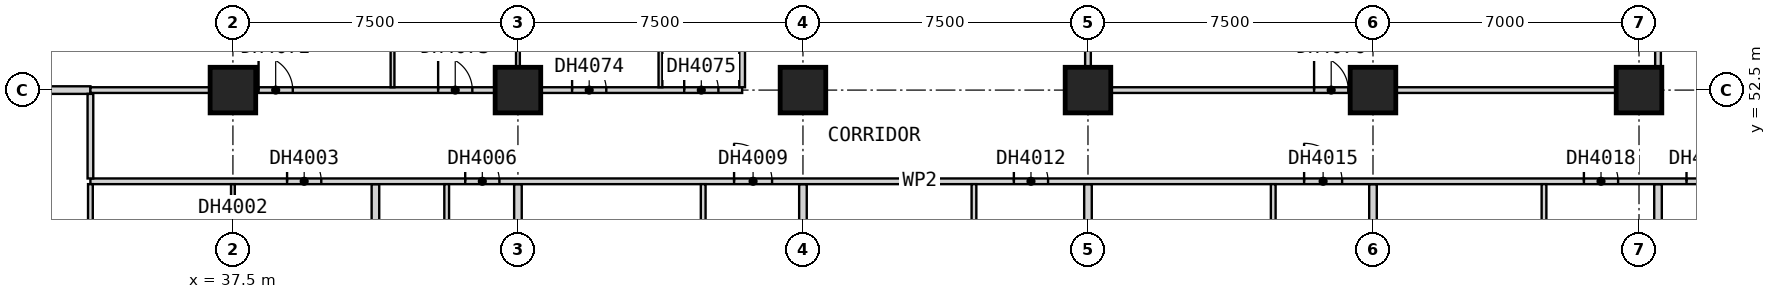
"""IFC4 building model, lengths in metres.
Left out: names, types, materials, properties, quantities, classifications, styles, units other than length and angle.
Written with IfcOpenShell. Run it as: python <this file> out.ifc"""

import sys

from ifc_helpers import new_model, si_unit, direction, frame, frame_2d, origin, origin_2d, place, context, subcontext, project, spatial, rectangle, extrude, element, fill, save


model = new_model("IFC4")
c1 = context("Model", 3, precision=1e-05, world=origin(), true_north=direction((0.0, 1.0)))
c2 = subcontext(c1, "Body", "Model", "MODEL_VIEW")
j1 = project(units=[si_unit("LENGTHUNIT", "METRE"), si_unit("PLANEANGLEUNIT", "RADIAN")], contexts=[c1])
p1 = place(None, origin())
s1 = spatial("IfcSite", under=j1, at=p1, CompositionType="ELEMENT")
p2 = place(p1, origin())
s2 = spatial("IfcBuilding", under=s1, at=p2, CompositionType="ELEMENT")
p3 = place(p2, frame((0.0, 0.0, 44.8)))
s3 = spatial("IfcBuildingStorey", under=s2, at=p3, CompositionType="ELEMENT", Elevation=44.8)
for number, where, z_axis, x_axis in (
    (1, (37.5, 52.5, 0.0), (0.0, 0.0, 1.0), (1.0, 0.0, 0.0)),
    (2, (45.0, 52.5, 0.0), (0.0, 0.0, 1.0), (1.0, 0.0, 0.0)),
    (3, (52.5, 52.5, 0.0), (0.0, 0.0, 1.0), (1.0, 0.0, 0.0)),
    (4, (60.0, 52.5, 0.0), (0.0, 0.0, 1.0), (1.0, 0.0, 0.0)),
    (5, (67.5, 52.5, 0.0), (0.0, 0.0, 1.0), (1.0, 0.0, 0.0)),
    (6, (74.5, 52.5, 0.0), (0.0, 0.0, 1.0), (1.0, 0.0, 0.0)),
):
    element("IfcColumn", number, at=place(p3, frame(where, z_axis=z_axis, x_axis=x_axis)), inside=s3, PredefinedType="COLUMN", context=c2, shape_type="SweptSolid", body=[
        extrude(rectangle(XDim=1.2, YDim=1.2, at=origin_2d()), origin(), (0.0, 0.0, 1.0), 3.6),
    ])
p4 = place(p3, frame((30.0, 52.5, 0.0), z_axis=(0.0, 0.0, 1.0), x_axis=(1.0, 0.0, 0.0)))
e7 = element("IfcWall", 7, at=p4, inside=s3, PredefinedType="PARTITIONING", context=c2, shape_type="SweptSolid", body=[
    extrude(rectangle(XDim=3.75, YDim=0.2, at=frame_2d((1.875, 0.0))), origin(), (0.0, 0.0, 1.0), 3.35),
])
p5 = place(p3, frame((41.25, 38.31, 0.0), z_axis=(0.0, 0.0, 1.0), x_axis=(0.0, 1.0, 0.0)))
e8 = element("IfcWall", 8, at=p5, inside=s3, PredefinedType="PARTITIONING", context=c2, shape_type="SweptSolid", body=[
    extrude(rectangle(XDim=11.715, YDim=0.2, at=frame_2d((5.857, 0.0))), origin(), (0.0, 0.0, 1.0), 3.35),
])
for number, where, z_axis, x_axis in (
    (9, (45.0, 37.5, 0.0), (0.0, 0.0, 1.0), (0.0, 1.0, 0.0)),
    (10, (52.5, 37.5, 0.0), (0.0, 0.0, 1.0), (0.0, 1.0, 0.0)),
    (11, (60.0, 37.5, 0.0), (0.0, 0.0, 1.0), (0.0, 1.0, 0.0)),
    (12, (67.5, 37.5, 0.0), (0.0, 0.0, 1.0), (0.0, 1.0, 0.0)),
):
    element("IfcWall", number, at=place(p3, frame(where, z_axis=z_axis, x_axis=x_axis)), inside=s3, PredefinedType="PARTITIONING", context=c2, shape_type="SweptSolid", body=[
        extrude(rectangle(XDim=12.525, YDim=0.2, at=frame_2d((6.262, 0.0))), origin(), (0.0, 0.0, 1.0), 3.35),
    ])
p6 = place(p3, frame((75.0, 38.31, 0.0), z_axis=(0.0, 0.0, 1.0), x_axis=(0.0, 1.0, 0.0)))
e13 = element("IfcWall", 13, at=p6, inside=s3, PredefinedType="PARTITIONING", context=c2, shape_type="SweptSolid", body=[
    extrude(rectangle(XDim=11.715, YDim=0.2, at=frame_2d((5.857, 0.0))), origin(), (0.0, 0.0, 1.0), 3.35),
])
p7 = place(p3, frame((33.75, 50.1, 0.0), z_axis=(0.0, 0.0, 1.0), x_axis=(1.0, 0.0, 0.0)))
e14 = element("IfcWall", 14, at=p7, inside=s3, PredefinedType="PARTITIONING", context=c2, shape_type="SweptSolid", body=[
    extrude(rectangle(XDim=43.65, YDim=0.15, at=frame_2d((21.825, 0.0))), origin(), (0.0, 0.0, 1.0), 3.35),
])
p8 = place(p7, frame((5.175, 0.0, 0.0)))
e15 = element("IfcOpeningElement", 15, at=p8, cuts=e14, PredefinedType="OPENING", context=c2, shape_type="SweptSolid", body=[
    extrude(rectangle(XDim=0.9, YDim=2.1, at=frame_2d((0.45, 1.05))), frame((0.0, 0.085, 0.0), z_axis=(0.0, -1.0, 0.0), x_axis=(1.0, 0.0, 0.0)), (0.0, 0.0, 1.0), 0.17),
])
p9 = place(p7, frame((9.863, 0.0, 0.0)))
e16 = element("IfcOpeningElement", 16, at=p9, cuts=e14, PredefinedType="OPENING", context=c2, shape_type="SweptSolid", body=[
    extrude(rectangle(XDim=0.9, YDim=2.1, at=frame_2d((0.45, 1.05))), frame((0.0, 0.085, 0.0), z_axis=(0.0, -1.0, 0.0), x_axis=(1.0, 0.0, 0.0)), (0.0, 0.0, 1.0), 0.17),
])
p10 = place(p7, frame((16.938, 0.0, 0.0)))
e17 = element("IfcOpeningElement", 17, at=p10, cuts=e14, PredefinedType="OPENING", context=c2, shape_type="SweptSolid", body=[
    extrude(rectangle(XDim=1.0, YDim=2.1, at=frame_2d((0.5, 1.05))), frame((0.0, 0.085, 0.0), z_axis=(0.0, -1.0, 0.0), x_axis=(1.0, 0.0, 0.0)), (0.0, 0.0, 1.0), 0.17),
])
p11 = place(p7, frame((24.3, 0.0, 0.0)))
e18 = element("IfcOpeningElement", 18, at=p11, cuts=e14, PredefinedType="OPENING", context=c2, shape_type="SweptSolid", body=[
    extrude(rectangle(XDim=0.9, YDim=2.1, at=frame_2d((0.45, 1.05))), frame((0.0, 0.085, 0.0), z_axis=(0.0, -1.0, 0.0), x_axis=(1.0, 0.0, 0.0)), (0.0, 0.0, 1.0), 0.17),
])
p12 = place(p7, frame((31.938, 0.0, 0.0)))
e19 = element("IfcOpeningElement", 19, at=p12, cuts=e14, PredefinedType="OPENING", context=c2, shape_type="SweptSolid", body=[
    extrude(rectangle(XDim=1.0, YDim=2.1, at=frame_2d((0.5, 1.05))), frame((0.0, 0.085, 0.0), z_axis=(0.0, -1.0, 0.0), x_axis=(1.0, 0.0, 0.0)), (0.0, 0.0, 1.0), 0.17),
])
p13 = place(p7, frame((39.3, 0.0, 0.0)))
e20 = element("IfcOpeningElement", 20, at=p13, cuts=e14, PredefinedType="OPENING", context=c2, shape_type="SweptSolid", body=[
    extrude(rectangle(XDim=0.9, YDim=2.1, at=frame_2d((0.45, 1.05))), frame((0.0, 0.085, 0.0), z_axis=(0.0, -1.0, 0.0), x_axis=(1.0, 0.0, 0.0)), (0.0, 0.0, 1.0), 0.17),
])
p14 = place(p7, frame((42.0, 0.0, 0.0)))
e21 = element("IfcOpeningElement", 21, at=p14, cuts=e14, PredefinedType="OPENING", context=c2, shape_type="SweptSolid", body=[
    extrude(rectangle(XDim=0.9, YDim=2.1, at=frame_2d((0.45, 1.05))), frame((0.0, 0.085, 0.0), z_axis=(0.0, -1.0, 0.0), x_axis=(1.0, 0.0, 0.0)), (0.0, 0.0, 1.0), 0.17),
])
p15 = place(p3, frame((33.75, 52.5, 0.0), z_axis=(0.0, 0.0, 1.0), x_axis=(1.0, 0.0, 0.0)))
e22 = element("IfcWall", 22, at=p15, inside=s3, PredefinedType="PARTITIONING", context=c2, shape_type="SweptSolid", body=[
    extrude(rectangle(XDim=17.15, YDim=0.15, at=frame_2d((8.575, 0.0))), origin(), (0.0, 0.0, 1.0), 3.35),
])
p16 = place(p15, frame((4.425, 0.0, 0.0)))
e23 = element("IfcOpeningElement", 23, at=p16, cuts=e22, PredefinedType="OPENING", context=c2, shape_type="SweptSolid", body=[
    extrude(rectangle(XDim=0.9, YDim=2.1, at=frame_2d((0.45, 1.05))), frame((0.0, 0.085, 0.0), z_axis=(0.0, -1.0, 0.0), x_axis=(1.0, 0.0, 0.0)), (0.0, 0.0, 1.0), 0.17),
])
p17 = place(p15, frame((9.15, 0.0, 0.0)))
e24 = element("IfcOpeningElement", 24, at=p17, cuts=e22, PredefinedType="OPENING", context=c2, shape_type="SweptSolid", body=[
    extrude(rectangle(XDim=0.9, YDim=2.1, at=frame_2d((0.45, 1.05))), frame((0.0, 0.085, 0.0), z_axis=(0.0, -1.0, 0.0), x_axis=(1.0, 0.0, 0.0)), (0.0, 0.0, 1.0), 0.17),
])
p18 = place(p15, frame((12.675, 0.0, 0.0)))
e25 = element("IfcOpeningElement", 25, at=p18, cuts=e22, PredefinedType="OPENING", context=c2, shape_type="SweptSolid", body=[
    extrude(rectangle(XDim=0.9, YDim=2.1, at=frame_2d((0.45, 1.05))), frame((0.0, 0.085, 0.0), z_axis=(0.0, -1.0, 0.0), x_axis=(1.0, 0.0, 0.0)), (0.0, 0.0, 1.0), 0.17),
])
p19 = place(p15, frame((15.625, 0.0, 0.0)))
e26 = element("IfcOpeningElement", 26, at=p19, cuts=e22, PredefinedType="OPENING", context=c2, shape_type="SweptSolid", body=[
    extrude(rectangle(XDim=0.9, YDim=2.1, at=frame_2d((0.45, 1.05))), frame((0.0, 0.085, 0.0), z_axis=(0.0, -1.0, 0.0), x_axis=(1.0, 0.0, 0.0)), (0.0, 0.0, 1.0), 0.17),
])
p20 = place(p3, frame((60.0, 52.5, 0.0), z_axis=(0.0, 0.0, 1.0), x_axis=(1.0, 0.0, 0.0)))
e27 = element("IfcWall", 27, at=p20, inside=s3, PredefinedType="PARTITIONING", context=c2, shape_type="SweptSolid", body=[
    extrude(rectangle(XDim=15.0, YDim=0.15, at=frame_2d((7.5, 0.0))), origin(), (0.0, 0.0, 1.0), 3.35),
])
p21 = place(p20, frame((5.95, 0.0, 0.0)))
e28 = element("IfcOpeningElement", 28, at=p21, cuts=e27, PredefinedType="OPENING", context=c2, shape_type="SweptSolid", body=[
    extrude(rectangle(XDim=0.9, YDim=2.1, at=frame_2d((0.45, 1.05))), frame((0.0, 0.085, 0.0), z_axis=(0.0, -1.0, 0.0), x_axis=(1.0, 0.0, 0.0)), (0.0, 0.0, 1.0), 0.17),
])
p22 = place(p3, frame((33.75, 50.175, 0.0), z_axis=(0.0, 0.0, 1.0), x_axis=(0.0, 1.0, 0.0)))
e29 = element("IfcWall", 29, at=p22, inside=s3, PredefinedType="PARTITIONING", context=c2, shape_type="SweptSolid", body=[
    extrude(rectangle(XDim=2.225, YDim=0.15, at=frame_2d((1.112, 0.0))), origin(), (0.0, 0.0, 1.0), 3.35),
])
p23 = place(p3, frame((75.0, 52.575, 0.0), z_axis=(0.0, 0.0, 1.0), x_axis=(0.0, 1.0, 0.0)))
e30 = element("IfcWall", 30, at=p23, inside=s3, PredefinedType="PARTITIONING", context=c2, shape_type="SweptSolid", body=[
    extrude(rectangle(XDim=11.85, YDim=0.15, at=frame_2d((5.925, 0.0))), origin(), (0.0, 0.0, 1.0), 3.35),
])
p24 = place(p23, frame((9.225, 0.0, 0.0)))
e31 = element("IfcOpeningElement", 31, at=p24, cuts=e30, PredefinedType="OPENING", context=c2, shape_type="SweptSolid", body=[
    extrude(rectangle(XDim=0.9, YDim=2.1, at=frame_2d((0.45, 1.05))), frame((0.0, 0.085, 0.0), z_axis=(0.0, -1.0, 0.0), x_axis=(1.0, 0.0, 0.0)), (0.0, 0.0, 1.0), 0.17),
])
p25 = place(p3, frame((37.5, 45.55, 0.0), z_axis=(0.0, 0.0, 1.0), x_axis=(0.0, 1.0, 0.0)))
e32 = element("IfcWall", 32, at=p25, inside=s3, PredefinedType="PARTITIONING", context=c2, shape_type="SweptSolid", body=[
    extrude(rectangle(XDim=4.475, YDim=0.1, at=frame_2d((2.237, 0.0))), origin(), (0.0, 0.0, 1.0), 3.35),
])
p26 = place(p25, frame((1.8, 0.0, 0.0)))
e33 = element("IfcOpeningElement", 33, at=p26, cuts=e32, PredefinedType="OPENING", context=c2, shape_type="SweptSolid", body=[
    extrude(rectangle(XDim=0.9, YDim=2.1, at=frame_2d((0.45, 1.05))), frame((0.0, 0.06, 0.0), z_axis=(0.0, -1.0, 0.0), x_axis=(1.0, 0.0, 0.0)), (0.0, 0.0, 1.0), 0.12),
])
for number, where, z_axis, x_axis in (
    (34, (41.7, 52.575, 0.0), (0.0, 0.0, 1.0), (0.0, 1.0, 0.0)),
    (35, (45.0, 52.575, 0.0), (0.0, 0.0, 1.0), (0.0, 1.0, 0.0)),
    (36, (48.75, 52.575, 0.0), (0.0, 0.0, 1.0), (0.0, 1.0, 0.0)),
):
    element("IfcWall", number, at=place(p3, frame(where, z_axis=z_axis, x_axis=x_axis)), inside=s3, PredefinedType="PARTITIONING", context=c2, shape_type="SweptSolid", body=[
        extrude(rectangle(XDim=7.425, YDim=0.1, at=frame_2d((3.712, 0.0))), origin(), (0.0, 0.0, 1.0), 3.35),
    ])
for number, where, z_axis, x_axis in (
    (37, (33.75, 45.562, 0.0), (0.0, 0.0, 1.0), (0.0, 1.0, 0.0)),
    (38, (43.125, 45.562, 0.0), (0.0, 0.0, 1.0), (0.0, 1.0, 0.0)),
    (39, (49.875, 45.562, 0.0), (0.0, 0.0, 1.0), (0.0, 1.0, 0.0)),
    (40, (57.0, 45.562, 0.0), (0.0, 0.0, 1.0), (0.0, 1.0, 0.0)),
    (41, (64.875, 45.562, 0.0), (0.0, 0.0, 1.0), (0.0, 1.0, 0.0)),
    (42, (72.0, 45.562, 0.0), (0.0, 0.0, 1.0), (0.0, 1.0, 0.0)),
):
    element("IfcWall", number, at=place(p3, frame(where, z_axis=z_axis, x_axis=x_axis)), inside=s3, PredefinedType="PARTITIONING", context=c2, shape_type="SweptSolid", body=[
        extrude(rectangle(XDim=4.462, YDim=0.125, at=frame_2d((2.231, 0.0))), origin(), (0.0, 0.0, 1.0), 3.35),
    ])
for number, where, z_axis, x_axis in (
    (43, (50.9, 52.575, 0.0), (0.0, 0.0, 1.0), (0.0, 1.0, 0.0)),
    (44, (60.0, 52.575, 0.0), (0.0, 0.0, 1.0), (0.0, 1.0, 0.0)),
):
    element("IfcWall", number, at=place(p3, frame(where, z_axis=z_axis, x_axis=x_axis)), inside=s3, PredefinedType="PARTITIONING", context=c2, shape_type="SweptSolid", body=[
        extrude(rectangle(XDim=7.425, YDim=0.15, at=frame_2d((3.712, 0.0))), origin(), (0.0, 0.0, 1.0), 3.35),
    ])
p27 = place(p8, origin())
e45 = element("IfcDoor", 45, at=p27, inside=s3, OperationType="SINGLE_SWING_RIGHT", PredefinedType="DOOR", context=c2, shape_type="SweptSolid", body=[
    extrude(rectangle(XDim=0.9, YDim=2.1, at=frame_2d((0.45, 1.05))), frame((0.0, 0.025, 0.0), z_axis=(0.0, -1.0, 0.0), x_axis=(1.0, 0.0, 0.0)), (0.0, 0.0, 1.0), 0.05),
])
fill(e15, e45)
p28 = place(p9, origin())
e46 = element("IfcDoor", 46, at=p28, inside=s3, OperationType="SINGLE_SWING_RIGHT", PredefinedType="DOOR", context=c2, shape_type="SweptSolid", body=[
    extrude(rectangle(XDim=0.9, YDim=2.1, at=frame_2d((0.45, 1.05))), frame((0.0, 0.025, 0.0), z_axis=(0.0, -1.0, 0.0), x_axis=(1.0, 0.0, 0.0)), (0.0, 0.0, 1.0), 0.05),
])
fill(e16, e46)
p29 = place(p10, origin())
e47 = element("IfcDoor", 47, at=p29, inside=s3, OperationType="SINGLE_SWING_RIGHT", PredefinedType="DOOR", context=c2, shape_type="SweptSolid", body=[
    extrude(rectangle(XDim=1.0, YDim=2.1, at=frame_2d((0.5, 1.05))), frame((0.0, 0.025, 0.0), z_axis=(0.0, -1.0, 0.0), x_axis=(1.0, 0.0, 0.0)), (0.0, 0.0, 1.0), 0.05),
])
fill(e17, e47)
p30 = place(p11, origin())
e48 = element("IfcDoor", 48, at=p30, inside=s3, OperationType="SINGLE_SWING_RIGHT", PredefinedType="DOOR", context=c2, shape_type="SweptSolid", body=[
    extrude(rectangle(XDim=0.9, YDim=2.1, at=frame_2d((0.45, 1.05))), frame((0.0, 0.025, 0.0), z_axis=(0.0, -1.0, 0.0), x_axis=(1.0, 0.0, 0.0)), (0.0, 0.0, 1.0), 0.05),
])
fill(e18, e48)
p31 = place(p12, origin())
e49 = element("IfcDoor", 49, at=p31, inside=s3, OperationType="SINGLE_SWING_RIGHT", PredefinedType="DOOR", context=c2, shape_type="SweptSolid", body=[
    extrude(rectangle(XDim=1.0, YDim=2.1, at=frame_2d((0.5, 1.05))), frame((0.0, 0.025, 0.0), z_axis=(0.0, -1.0, 0.0), x_axis=(1.0, 0.0, 0.0)), (0.0, 0.0, 1.0), 0.05),
])
fill(e19, e49)
p32 = place(p13, origin())
e50 = element("IfcDoor", 50, at=p32, inside=s3, OperationType="SINGLE_SWING_RIGHT", PredefinedType="DOOR", context=c2, shape_type="SweptSolid", body=[
    extrude(rectangle(XDim=0.9, YDim=2.1, at=frame_2d((0.45, 1.05))), frame((0.0, 0.025, 0.0), z_axis=(0.0, -1.0, 0.0), x_axis=(1.0, 0.0, 0.0)), (0.0, 0.0, 1.0), 0.05),
])
fill(e20, e50)
p33 = place(p14, origin())
e51 = element("IfcDoor", 51, at=p33, inside=s3, OperationType="SINGLE_SWING_LEFT", PredefinedType="DOOR", context=c2, shape_type="SweptSolid", body=[
    extrude(rectangle(XDim=0.9, YDim=2.1, at=frame_2d((0.45, 1.05))), frame((0.0, 0.025, 0.0), z_axis=(0.0, -1.0, 0.0), x_axis=(1.0, 0.0, 0.0)), (0.0, 0.0, 1.0), 0.05),
])
fill(e21, e51)
p34 = place(p16, origin())
e52 = element("IfcDoor", 52, at=p34, inside=s3, OperationType="SINGLE_SWING_RIGHT", PredefinedType="DOOR", context=c2, shape_type="SweptSolid", body=[
    extrude(rectangle(XDim=0.9, YDim=2.1, at=frame_2d((0.45, 1.05))), frame((0.0, 0.025, 0.0), z_axis=(0.0, -1.0, 0.0), x_axis=(1.0, 0.0, 0.0)), (0.0, 0.0, 1.0), 0.05),
])
fill(e23, e52)
p35 = place(p17, origin())
e53 = element("IfcDoor", 53, at=p35, inside=s3, OperationType="SINGLE_SWING_LEFT", PredefinedType="DOOR", context=c2, shape_type="SweptSolid", body=[
    extrude(rectangle(XDim=0.9, YDim=2.1, at=frame_2d((0.45, 1.05))), frame((0.0, 0.025, 0.0), z_axis=(0.0, -1.0, 0.0), x_axis=(1.0, 0.0, 0.0)), (0.0, 0.0, 1.0), 0.05),
])
fill(e24, e53)
p36 = place(p18, origin())
e54 = element("IfcDoor", 54, at=p36, inside=s3, OperationType="SINGLE_SWING_LEFT", PredefinedType="DOOR", context=c2, shape_type="SweptSolid", body=[
    extrude(rectangle(XDim=0.9, YDim=2.1, at=frame_2d((0.45, 1.05))), frame((0.0, 0.025, 0.0), z_axis=(0.0, -1.0, 0.0), x_axis=(1.0, 0.0, 0.0)), (0.0, 0.0, 1.0), 0.05),
])
fill(e25, e54)
p37 = place(p19, origin())
e55 = element("IfcDoor", 55, at=p37, inside=s3, OperationType="SINGLE_SWING_LEFT", PredefinedType="DOOR", context=c2, shape_type="SweptSolid", body=[
    extrude(rectangle(XDim=0.9, YDim=2.1, at=frame_2d((0.45, 1.05))), frame((0.0, 0.025, 0.0), z_axis=(0.0, -1.0, 0.0), x_axis=(1.0, 0.0, 0.0)), (0.0, 0.0, 1.0), 0.05),
])
fill(e26, e55)
p38 = place(p21, origin())
e56 = element("IfcDoor", 56, at=p38, inside=s3, OperationType="SINGLE_SWING_LEFT", PredefinedType="DOOR", context=c2, shape_type="SweptSolid", body=[
    extrude(rectangle(XDim=0.9, YDim=2.1, at=frame_2d((0.45, 1.05))), frame((0.0, 0.025, 0.0), z_axis=(0.0, -1.0, 0.0), x_axis=(1.0, 0.0, 0.0)), (0.0, 0.0, 1.0), 0.05),
])
fill(e28, e56)
save(model, sys.argv[1])
